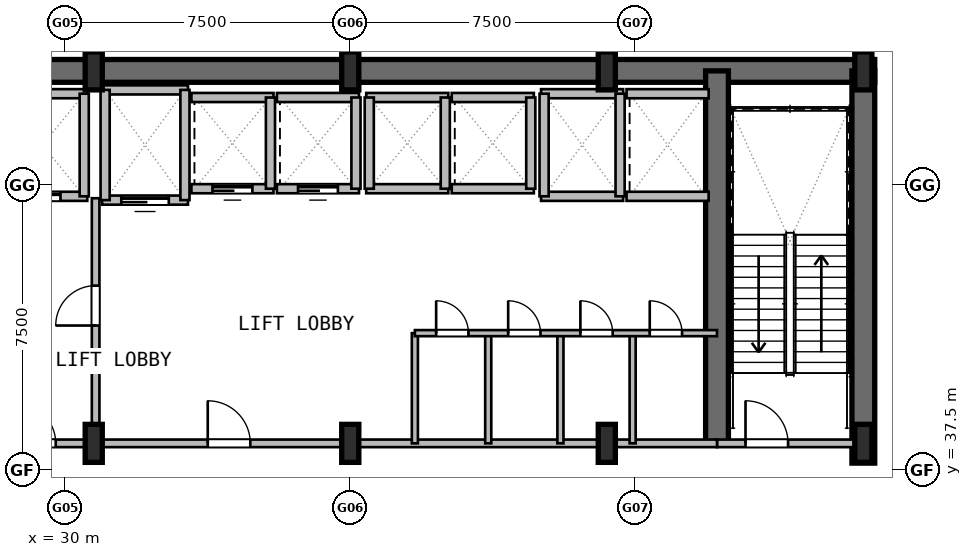
"""IFC4 building model, lengths in metres.
Left out: names, types, materials, properties, quantities, classifications, styles, units other than length and angle.
Written with IfcOpenShell. Run it as: python <this file> out.ifc"""

import sys

from ifc_helpers import new_model, si_unit, direction, frame, frame_2d, origin, origin_2d, place, context, subcontext, project, spatial, rectangle, i_section, extrude, element, fill, save


model = new_model("IFC4")
c1 = context("Model", 3, precision=1e-05, world=origin(), true_north=direction((0.0, 1.0)))
c2 = subcontext(c1, "Body", "Model", "MODEL_VIEW")
j1 = project(units=[si_unit("LENGTHUNIT", "METRE"), si_unit("PLANEANGLEUNIT", "RADIAN")], contexts=[c1])
p1 = place(None, origin())
s1 = spatial("IfcSite", under=j1, at=p1, CompositionType="ELEMENT")
p2 = place(p1, origin())
s2 = spatial("IfcBuilding", under=s1, at=p2, CompositionType="ELEMENT")
p3 = place(p2, frame((0.0, 0.0, 20.4)))
s3 = spatial("IfcBuildingStorey", under=s2, at=p3, CompositionType="ELEMENT", Elevation=20.4)
p4 = place(p3, frame((23.7, 48.0, 0.0), z_axis=(0.0, 0.0, 1.0), x_axis=(1.0, 0.0, 0.0)))
e1 = element("IfcWall", 1, at=p4, inside=s3, PredefinedType="SHEAR", context=c2, shape_type="SweptSolid", body=[
    extrude(rectangle(XDim=27.6, YDim=0.6, at=frame_2d((13.8, 0.0))), origin(), (0.0, 0.0, 1.0), 4.8),
])
p5 = place(p3, frame((51.0, 37.68, 0.0), z_axis=(0.0, 0.0, 1.0), x_axis=(0.0, 1.0, 0.0)))
e2 = element("IfcWall", 2, at=p5, inside=s3, PredefinedType="SHEAR", context=c2, shape_type="SweptSolid", body=[
    extrude(rectangle(XDim=10.32, YDim=0.6, at=frame_2d((5.16, 0.0))), origin(), (0.0, 0.0, 1.0), 4.8),
])
p6 = place(p3, frame((47.15, 38.2, 0.0), z_axis=(0.0, 0.0, 1.0), x_axis=(0.0, 1.0, 0.0)))
e3 = element("IfcWall", 3, at=p6, inside=s3, PredefinedType="SHEAR", context=c2, shape_type="SweptSolid", body=[
    extrude(rectangle(XDim=9.8, YDim=0.6, at=frame_2d((4.9, 0.0))), origin(), (0.0, 0.0, 1.0), 4.8),
])
for number, where, z_axis, x_axis in (
    (4, (30.75, 38.2, 0.0), (0.0, 0.0, 1.0), (1.0, 0.0, 0.0)),
    (5, (30.75, 48.0, 0.0), (0.0, 0.0, 1.0), (1.0, 0.0, 0.0)),
    (6, (37.5, 38.2, 0.0), (0.0, 0.0, 1.0), (1.0, 0.0, 0.0)),
    (7, (37.5, 48.0, 0.0), (0.0, 0.0, 1.0), (1.0, 0.0, 0.0)),
    (8, (44.25, 38.2, 0.0), (0.0, 0.0, 1.0), (1.0, 0.0, 0.0)),
    (9, (44.25, 48.0, 0.0), (0.0, 0.0, 1.0), (1.0, 0.0, 0.0)),
    (10, (51.0, 38.2, 0.0), (0.0, 0.0, 1.0), (1.0, 0.0, 0.0)),
    (11, (51.0, 48.0, 0.0), (0.0, 0.0, 1.0), (1.0, 0.0, 0.0)),
):
    element("IfcColumn", number, at=place(p3, frame(where, z_axis=z_axis, x_axis=x_axis)), inside=s3, PredefinedType="COLUMN", context=c2, shape_type="SweptSolid", body=[
        extrude(i_section(OverallWidth=0.45, OverallDepth=1.0, WebThickness=0.022, FlangeThickness=0.04, at=origin_2d()), origin(), (0.0, 0.0, 1.0), 4.8),
    ])
p7 = place(p3, frame((47.15, 38.2, 0.0), z_axis=(0.0, 0.0, 1.0), x_axis=(1.0, 0.0, 0.0)))
e12 = element("IfcWall", 12, at=p7, inside=s3, PredefinedType="PARTITIONING", context=c2, shape_type="SweptSolid", body=[
    extrude(rectangle(XDim=3.85, YDim=0.2, at=frame_2d((1.925, 0.0))), origin(), (0.0, 0.0, 1.0), 3.63),
])
p8 = place(p7, frame((0.75, 0.0, 0.0)))
e13 = element("IfcOpeningElement", 13, at=p8, cuts=e12, PredefinedType="OPENING", context=c2, shape_type="SweptSolid", body=[
    extrude(rectangle(XDim=1.12, YDim=2.1, at=frame_2d((0.56, 1.05))), frame((0.0, 0.11, 0.0), z_axis=(0.0, -1.0, 0.0), x_axis=(1.0, 0.0, 0.0)), (0.0, 0.0, 1.0), 0.22),
])
p9 = place(p3, frame((30.8, 38.2, 0.0), z_axis=(0.0, 0.0, 1.0), x_axis=(0.0, 1.0, 0.0)))
e14 = element("IfcWall", 14, at=p9, inside=s3, PredefinedType="PARTITIONING", context=c2, shape_type="SweptSolid", body=[
    extrude(rectangle(XDim=6.45, YDim=0.2, at=frame_2d((3.225, 0.0))), origin(), (0.0, 0.0, 1.0), 3.63),
])
p10 = place(p9, frame((3.1, 0.0, 0.0)))
e15 = element("IfcOpeningElement", 15, at=p10, cuts=e14, PredefinedType="OPENING", context=c2, shape_type="SweptSolid", body=[
    extrude(rectangle(XDim=1.05, YDim=2.1, at=frame_2d((0.525, 1.05))), frame((0.0, 0.11, 0.0), z_axis=(0.0, -1.0, 0.0), x_axis=(1.0, 0.0, 0.0)), (0.0, 0.0, 1.0), 0.22),
])
p11 = place(p3, frame((27.95, 38.2, 0.0), z_axis=(0.0, 0.0, 1.0), x_axis=(1.0, 0.0, 0.0)))
e16 = element("IfcWall", 16, at=p11, inside=s3, PredefinedType="PARTITIONING", context=c2, shape_type="SweptSolid", body=[
    extrude(rectangle(XDim=2.85, YDim=0.2, at=frame_2d((1.425, 0.0))), origin(), (0.0, 0.0, 1.0), 3.63),
])
p12 = place(p11, frame((0.75, 0.0, 0.0)))
e17 = element("IfcOpeningElement", 17, at=p12, cuts=e16, PredefinedType="OPENING", context=c2, shape_type="SweptSolid", body=[
    extrude(rectangle(XDim=1.05, YDim=2.1, at=frame_2d((0.525, 1.05))), frame((0.0, 0.11, 0.0), z_axis=(0.0, -1.0, 0.0), x_axis=(1.0, 0.0, 0.0)), (0.0, 0.0, 1.0), 0.22),
])
p13 = place(p3, frame((30.8, 38.2, 0.0), z_axis=(0.0, 0.0, 1.0), x_axis=(1.0, 0.0, 0.0)))
e18 = element("IfcWall", 18, at=p13, inside=s3, PredefinedType="PARTITIONING", context=c2, shape_type="SweptSolid", body=[
    extrude(rectangle(XDim=16.35, YDim=0.2, at=frame_2d((8.175, 0.0))), origin(), (0.0, 0.0, 1.0), 3.63),
])
p14 = place(p13, frame((2.95, 0.0, 0.0)))
e19 = element("IfcOpeningElement", 19, at=p14, cuts=e18, PredefinedType="OPENING", context=c2, shape_type="SweptSolid", body=[
    extrude(rectangle(XDim=1.12, YDim=2.1, at=frame_2d((0.56, 1.05))), frame((0.0, 0.11, 0.0), z_axis=(0.0, -1.0, 0.0), x_axis=(1.0, 0.0, 0.0)), (0.0, 0.0, 1.0), 0.22),
])
p15 = place(p3, frame((28.22, 44.7, 0.0), z_axis=(0.0, 0.0, 1.0), x_axis=(1.0, 0.0, 0.0)))
e20 = element("IfcWall", 20, at=p15, inside=s3, PredefinedType="PARTITIONING", context=c2, shape_type="SweptSolid", body=[
    extrude(rectangle(XDim=2.36, YDim=0.24, at=frame_2d((1.18, 0.0))), origin(), (0.0, 0.0, 1.0), 4.43),
])
p16 = place(p15, frame((0.705, 0.0, 0.0)))
e21 = element("IfcOpeningElement", 21, at=p16, cuts=e20, PredefinedType="OPENING", context=c2, shape_type="SweptSolid", body=[
    extrude(rectangle(XDim=0.95, YDim=2.15, at=frame_2d((0.475, 1.075))), frame((0.0, 0.13, 0.0), z_axis=(0.0, -1.0, 0.0), x_axis=(1.0, 0.0, 0.0)), (0.0, 0.0, 1.0), 0.26),
])
p17 = place(p3, frame((28.22, 47.4, 0.0), z_axis=(0.0, 0.0, 1.0), x_axis=(1.0, 0.0, 0.0)))
e22 = element("IfcWall", 22, at=p17, inside=s3, PredefinedType="PARTITIONING", context=c2, shape_type="SweptSolid", body=[
    extrude(rectangle(XDim=2.36, YDim=0.24, at=frame_2d((1.18, 0.0))), origin(), (0.0, 0.0, 1.0), 4.43),
])
p18 = place(p3, frame((30.5, 44.7, 0.0), z_axis=(0.0, 0.0, 1.0), x_axis=(0.0, 1.0, 0.0)))
e23 = element("IfcWall", 23, at=p18, inside=s3, PredefinedType="PARTITIONING", context=c2, shape_type="SweptSolid", body=[
    extrude(rectangle(XDim=2.7, YDim=0.24, at=frame_2d((1.35, 0.0))), origin(), (0.0, 0.0, 1.0), 3.63),
])
p19 = place(p3, frame((30.97, 44.6, 0.0), z_axis=(0.0, 0.0, 1.0), x_axis=(1.0, 0.0, 0.0)))
e24 = element("IfcWall", 24, at=p19, inside=s3, PredefinedType="PARTITIONING", context=c2, shape_type="SweptSolid", body=[
    extrude(rectangle(XDim=2.26, YDim=0.24, at=frame_2d((1.13, 0.0))), origin(), (0.0, 0.0, 1.0), 4.43),
])
p20 = place(p19, frame((0.505, 0.0, 0.0)))
e25 = element("IfcOpeningElement", 25, at=p20, cuts=e24, PredefinedType="OPENING", context=c2, shape_type="SweptSolid", body=[
    extrude(rectangle(XDim=1.25, YDim=2.2, at=frame_2d((0.625, 1.1))), frame((0.0, 0.13, 0.0), z_axis=(0.0, -1.0, 0.0), x_axis=(1.0, 0.0, 0.0)), (0.0, 0.0, 1.0), 0.26),
])
p21 = place(p3, frame((30.97, 47.5, 0.0), z_axis=(0.0, 0.0, 1.0), x_axis=(1.0, 0.0, 0.0)))
e26 = element("IfcWall", 26, at=p21, inside=s3, PredefinedType="PARTITIONING", context=c2, shape_type="SweptSolid", body=[
    extrude(rectangle(XDim=2.26, YDim=0.24, at=frame_2d((1.13, 0.0))), origin(), (0.0, 0.0, 1.0), 4.43),
])
p22 = place(p3, frame((31.05, 44.6, 0.0), z_axis=(0.0, 0.0, 1.0), x_axis=(0.0, 1.0, 0.0)))
e27 = element("IfcWall", 27, at=p22, inside=s3, PredefinedType="PARTITIONING", context=c2, shape_type="SweptSolid", body=[
    extrude(rectangle(XDim=2.9, YDim=0.24, at=frame_2d((1.45, 0.0))), origin(), (0.0, 0.0, 1.0), 3.63),
])
p23 = place(p3, frame((33.15, 44.6, 0.0), z_axis=(0.0, 0.0, 1.0), x_axis=(0.0, 1.0, 0.0)))
e28 = element("IfcWall", 28, at=p23, inside=s3, PredefinedType="PARTITIONING", context=c2, shape_type="SweptSolid", body=[
    extrude(rectangle(XDim=2.9, YDim=0.24, at=frame_2d((1.45, 0.0))), origin(), (0.0, 0.0, 1.0), 4.43),
])
p24 = place(p3, frame((33.32, 44.9, 0.0), z_axis=(0.0, 0.0, 1.0), x_axis=(1.0, 0.0, 0.0)))
e29 = element("IfcWall", 29, at=p24, inside=s3, PredefinedType="PARTITIONING", context=c2, shape_type="SweptSolid", body=[
    extrude(rectangle(XDim=2.16, YDim=0.24, at=frame_2d((1.08, 0.0))), origin(), (0.0, 0.0, 1.0), 4.43),
])
p25 = place(p24, frame((0.555, 0.0, 0.0)))
e30 = element("IfcOpeningElement", 30, at=p25, cuts=e29, PredefinedType="OPENING", context=c2, shape_type="SweptSolid", body=[
    extrude(rectangle(XDim=1.05, YDim=2.15, at=frame_2d((0.525, 1.075))), frame((0.0, 0.13, 0.0), z_axis=(0.0, -1.0, 0.0), x_axis=(1.0, 0.0, 0.0)), (0.0, 0.0, 1.0), 0.26),
])
p26 = place(p3, frame((33.32, 47.3, 0.0), z_axis=(0.0, 0.0, 1.0), x_axis=(1.0, 0.0, 0.0)))
e31 = element("IfcWall", 31, at=p26, inside=s3, PredefinedType="PARTITIONING", context=c2, shape_type="SweptSolid", body=[
    extrude(rectangle(XDim=2.16, YDim=0.24, at=frame_2d((1.08, 0.0))), origin(), (0.0, 0.0, 1.0), 4.43),
])
p27 = place(p3, frame((35.4, 44.9, 0.0), z_axis=(0.0, 0.0, 1.0), x_axis=(0.0, 1.0, 0.0)))
e32 = element("IfcWall", 32, at=p27, inside=s3, PredefinedType="PARTITIONING", context=c2, shape_type="SweptSolid", body=[
    extrude(rectangle(XDim=2.4, YDim=0.24, at=frame_2d((1.2, 0.0))), origin(), (0.0, 0.0, 1.0), 4.43),
])
p28 = place(p3, frame((35.57, 44.9, 0.0), z_axis=(0.0, 0.0, 1.0), x_axis=(1.0, 0.0, 0.0)))
e33 = element("IfcWall", 33, at=p28, inside=s3, PredefinedType="PARTITIONING", context=c2, shape_type="SweptSolid", body=[
    extrude(rectangle(XDim=2.16, YDim=0.24, at=frame_2d((1.08, 0.0))), origin(), (0.0, 0.0, 1.0), 4.43),
])
p29 = place(p28, frame((0.555, 0.0, 0.0)))
e34 = element("IfcOpeningElement", 34, at=p29, cuts=e33, PredefinedType="OPENING", context=c2, shape_type="SweptSolid", body=[
    extrude(rectangle(XDim=1.05, YDim=2.15, at=frame_2d((0.525, 1.075))), frame((0.0, 0.13, 0.0), z_axis=(0.0, -1.0, 0.0), x_axis=(1.0, 0.0, 0.0)), (0.0, 0.0, 1.0), 0.26),
])
p30 = place(p3, frame((35.57, 47.3, 0.0), z_axis=(0.0, 0.0, 1.0), x_axis=(1.0, 0.0, 0.0)))
e35 = element("IfcWall", 35, at=p30, inside=s3, PredefinedType="PARTITIONING", context=c2, shape_type="SweptSolid", body=[
    extrude(rectangle(XDim=2.16, YDim=0.24, at=frame_2d((1.08, 0.0))), origin(), (0.0, 0.0, 1.0), 4.43),
])
p31 = place(p3, frame((37.65, 44.9, 0.0), z_axis=(0.0, 0.0, 1.0), x_axis=(0.0, 1.0, 0.0)))
e36 = element("IfcWall", 36, at=p31, inside=s3, PredefinedType="PARTITIONING", context=c2, shape_type="SweptSolid", body=[
    extrude(rectangle(XDim=2.4, YDim=0.24, at=frame_2d((1.2, 0.0))), origin(), (0.0, 0.0, 1.0), 4.43),
])
for number, where, z_axis, x_axis in (
    (37, (37.92, 44.9, 0.0), (0.0, 0.0, 1.0), (1.0, 0.0, 0.0)),
    (38, (37.92, 47.3, 0.0), (0.0, 0.0, 1.0), (1.0, 0.0, 0.0)),
):
    element("IfcWall", number, at=place(p3, frame(where, z_axis=z_axis, x_axis=x_axis)), inside=s3, PredefinedType="PARTITIONING", context=c2, shape_type="SweptSolid", body=[
        extrude(rectangle(XDim=2.16, YDim=0.24, at=frame_2d((1.08, 0.0))), origin(), (0.0, 0.0, 1.0), 4.43),
    ])
for number, where, z_axis, x_axis in (
    (39, (38.0, 44.9, 0.0), (0.0, 0.0, 1.0), (0.0, 1.0, 0.0)),
    (40, (40.0, 44.9, 0.0), (0.0, 0.0, 1.0), (0.0, 1.0, 0.0)),
):
    element("IfcWall", number, at=place(p3, frame(where, z_axis=z_axis, x_axis=x_axis)), inside=s3, PredefinedType="PARTITIONING", context=c2, shape_type="SweptSolid", body=[
        extrude(rectangle(XDim=2.4, YDim=0.24, at=frame_2d((1.2, 0.0))), origin(), (0.0, 0.0, 1.0), 4.43),
    ])
for number, where, z_axis, x_axis in (
    (41, (40.17, 44.9, 0.0), (0.0, 0.0, 1.0), (1.0, 0.0, 0.0)),
    (42, (40.17, 47.3, 0.0), (0.0, 0.0, 1.0), (1.0, 0.0, 0.0)),
):
    element("IfcWall", number, at=place(p3, frame(where, z_axis=z_axis, x_axis=x_axis)), inside=s3, PredefinedType="PARTITIONING", context=c2, shape_type="SweptSolid", body=[
        extrude(rectangle(XDim=2.16, YDim=0.24, at=frame_2d((1.08, 0.0))), origin(), (0.0, 0.0, 1.0), 4.43),
    ])
p32 = place(p3, frame((42.25, 44.9, 0.0), z_axis=(0.0, 0.0, 1.0), x_axis=(0.0, 1.0, 0.0)))
e43 = element("IfcWall", 43, at=p32, inside=s3, PredefinedType="PARTITIONING", context=c2, shape_type="SweptSolid", body=[
    extrude(rectangle(XDim=2.4, YDim=0.24, at=frame_2d((1.2, 0.0))), origin(), (0.0, 0.0, 1.0), 4.43),
])
for number, where, z_axis, x_axis in (
    (44, (42.52, 44.7, 0.0), (0.0, 0.0, 1.0), (1.0, 0.0, 0.0)),
    (45, (42.52, 47.4, 0.0), (0.0, 0.0, 1.0), (1.0, 0.0, 0.0)),
):
    element("IfcWall", number, at=place(p3, frame(where, z_axis=z_axis, x_axis=x_axis)), inside=s3, PredefinedType="PARTITIONING", context=c2, shape_type="SweptSolid", body=[
        extrude(rectangle(XDim=2.16, YDim=0.24, at=frame_2d((1.08, 0.0))), origin(), (0.0, 0.0, 1.0), 4.43),
    ])
for number, where, z_axis, x_axis in (
    (46, (42.6, 44.7, 0.0), (0.0, 0.0, 1.0), (0.0, 1.0, 0.0)),
    (47, (44.6, 44.7, 0.0), (0.0, 0.0, 1.0), (0.0, 1.0, 0.0)),
):
    element("IfcWall", number, at=place(p3, frame(where, z_axis=z_axis, x_axis=x_axis)), inside=s3, PredefinedType="PARTITIONING", context=c2, shape_type="SweptSolid", body=[
        extrude(rectangle(XDim=2.7, YDim=0.24, at=frame_2d((1.35, 0.0))), origin(), (0.0, 0.0, 1.0), 4.43),
    ])
for number, where, z_axis, x_axis in (
    (48, (44.77, 44.7, 0.0), (0.0, 0.0, 1.0), (1.0, 0.0, 0.0)),
    (49, (44.77, 47.4, 0.0), (0.0, 0.0, 1.0), (1.0, 0.0, 0.0)),
):
    element("IfcWall", number, at=place(p3, frame(where, z_axis=z_axis, x_axis=x_axis)), inside=s3, PredefinedType="PARTITIONING", context=c2, shape_type="SweptSolid", body=[
        extrude(rectangle(XDim=2.16, YDim=0.24, at=frame_2d((1.08, 0.0))), origin(), (0.0, 0.0, 1.0), 4.43),
    ])
for number, where, z_axis, x_axis in (
    (50, (39.2, 38.2, 0.0), (0.0, 0.0, 1.0), (0.0, 1.0, 0.0)),
    (51, (41.13, 38.2, 0.0), (0.0, 0.0, 1.0), (0.0, 1.0, 0.0)),
    (52, (43.03, 38.2, 0.0), (0.0, 0.0, 1.0), (0.0, 1.0, 0.0)),
    (53, (44.93, 38.2, 0.0), (0.0, 0.0, 1.0), (0.0, 1.0, 0.0)),
):
    element("IfcWall", number, at=place(p3, frame(where, z_axis=z_axis, x_axis=x_axis)), inside=s3, PredefinedType="PARTITIONING", context=c2, shape_type="SweptSolid", body=[
        extrude(rectangle(XDim=2.9, YDim=0.16, at=frame_2d((1.45, 0.0))), origin(), (0.0, 0.0, 1.0), 4.43),
    ])
p33 = place(p3, frame((39.2, 41.1, 0.0), z_axis=(0.0, 0.0, 1.0), x_axis=(1.0, 0.0, 0.0)))
e54 = element("IfcWall", 54, at=p33, inside=s3, PredefinedType="PARTITIONING", context=c2, shape_type="SweptSolid", body=[
    extrude(rectangle(XDim=7.95, YDim=0.16, at=frame_2d((3.975, 0.0))), origin(), (0.0, 0.0, 1.0), 4.43),
])
p34 = place(p33, frame((0.56, 0.0, 0.0)))
e55 = element("IfcOpeningElement", 55, at=p34, cuts=e54, PredefinedType="OPENING", context=c2, shape_type="SweptSolid", body=[
    extrude(rectangle(XDim=0.85, YDim=2.05, at=frame_2d((0.425, 1.025))), frame((0.0, 0.09, 0.0), z_axis=(0.0, -1.0, 0.0), x_axis=(1.0, 0.0, 0.0)), (0.0, 0.0, 1.0), 0.18),
])
p35 = place(p33, frame((2.455, 0.0, 0.0)))
e56 = element("IfcOpeningElement", 56, at=p35, cuts=e54, PredefinedType="OPENING", context=c2, shape_type="SweptSolid", body=[
    extrude(rectangle(XDim=0.85, YDim=2.05, at=frame_2d((0.425, 1.025))), frame((0.0, 0.09, 0.0), z_axis=(0.0, -1.0, 0.0), x_axis=(1.0, 0.0, 0.0)), (0.0, 0.0, 1.0), 0.18),
])
p36 = place(p33, frame((4.355, 0.0, 0.0)))
e57 = element("IfcOpeningElement", 57, at=p36, cuts=e54, PredefinedType="OPENING", context=c2, shape_type="SweptSolid", body=[
    extrude(rectangle(XDim=0.85, YDim=2.05, at=frame_2d((0.425, 1.025))), frame((0.0, 0.09, 0.0), z_axis=(0.0, -1.0, 0.0), x_axis=(1.0, 0.0, 0.0)), (0.0, 0.0, 1.0), 0.18),
])
p37 = place(p33, frame((6.18, 0.0, 0.0)))
e58 = element("IfcOpeningElement", 58, at=p37, cuts=e54, PredefinedType="OPENING", context=c2, shape_type="SweptSolid", body=[
    extrude(rectangle(XDim=0.85, YDim=2.05, at=frame_2d((0.425, 1.025))), frame((0.0, 0.09, 0.0), z_axis=(0.0, -1.0, 0.0), x_axis=(1.0, 0.0, 0.0)), (0.0, 0.0, 1.0), 0.18),
])
p38 = place(p8, origin())
e59 = element("IfcDoor", 59, at=p38, inside=s3, OperationType="SINGLE_SWING_LEFT", PredefinedType="DOOR", context=c2, shape_type="SweptSolid", body=[
    extrude(rectangle(XDim=1.12, YDim=2.1, at=frame_2d((0.56, 1.05))), frame((0.0, 0.025, 0.0), z_axis=(0.0, -1.0, 0.0), x_axis=(1.0, 0.0, 0.0)), (0.0, 0.0, 1.0), 0.05),
])
fill(e13, e59)
p39 = place(p10, origin())
e60 = element("IfcDoor", 60, at=p39, inside=s3, OperationType="SINGLE_SWING_RIGHT", PredefinedType="DOOR", context=c2, shape_type="SweptSolid", body=[
    extrude(rectangle(XDim=1.05, YDim=2.1, at=frame_2d((0.525, 1.05))), frame((0.0, 0.025, 0.0), z_axis=(0.0, -1.0, 0.0), x_axis=(1.0, 0.0, 0.0)), (0.0, 0.0, 1.0), 0.05),
])
fill(e15, e60)
p40 = place(p12, origin())
e61 = element("IfcDoor", 61, at=p40, inside=s3, OperationType="SINGLE_SWING_LEFT", PredefinedType="DOOR", context=c2, shape_type="SweptSolid", body=[
    extrude(rectangle(XDim=1.05, YDim=2.1, at=frame_2d((0.525, 1.05))), frame((0.0, 0.025, 0.0), z_axis=(0.0, -1.0, 0.0), x_axis=(1.0, 0.0, 0.0)), (0.0, 0.0, 1.0), 0.05),
])
fill(e17, e61)
p41 = place(p14, origin())
e62 = element("IfcDoor", 62, at=p41, inside=s3, OperationType="SINGLE_SWING_RIGHT", PredefinedType="DOOR", context=c2, shape_type="SweptSolid", body=[
    extrude(rectangle(XDim=1.12, YDim=2.1, at=frame_2d((0.56, 1.05))), frame((0.0, 0.025, 0.0), z_axis=(0.0, -1.0, 0.0), x_axis=(1.0, 0.0, 0.0)), (0.0, 0.0, 1.0), 0.05),
])
fill(e19, e62)
p42 = place(p16, origin())
e63 = element("IfcDoor", 63, at=p42, inside=s3, OperationType="SLIDING_TO_LEFT", PredefinedType="DOOR", context=c2, shape_type="SweptSolid", body=[
    extrude(rectangle(XDim=0.95, YDim=2.15, at=frame_2d((0.475, 1.075))), frame((0.0, 0.025, 0.0), z_axis=(0.0, -1.0, 0.0), x_axis=(1.0, 0.0, 0.0)), (0.0, 0.0, 1.0), 0.05),
])
fill(e21, e63)
p43 = place(p20, origin())
e64 = element("IfcDoor", 64, at=p43, inside=s3, OperationType="SLIDING_TO_LEFT", PredefinedType="DOOR", context=c2, shape_type="SweptSolid", body=[
    extrude(rectangle(XDim=1.25, YDim=2.2, at=frame_2d((0.625, 1.1))), frame((0.0, 0.025, 0.0), z_axis=(0.0, -1.0, 0.0), x_axis=(1.0, 0.0, 0.0)), (0.0, 0.0, 1.0), 0.05),
])
fill(e25, e64)
p44 = place(p25, origin())
e65 = element("IfcDoor", 65, at=p44, inside=s3, OperationType="SLIDING_TO_LEFT", PredefinedType="DOOR", context=c2, shape_type="SweptSolid", body=[
    extrude(rectangle(XDim=1.05, YDim=2.15, at=frame_2d((0.525, 1.075))), frame((0.0, 0.025, 0.0), z_axis=(0.0, -1.0, 0.0), x_axis=(1.0, 0.0, 0.0)), (0.0, 0.0, 1.0), 0.05),
])
fill(e30, e65)
p45 = place(p29, origin())
e66 = element("IfcDoor", 66, at=p45, inside=s3, OperationType="SLIDING_TO_LEFT", PredefinedType="DOOR", context=c2, shape_type="SweptSolid", body=[
    extrude(rectangle(XDim=1.05, YDim=2.15, at=frame_2d((0.525, 1.075))), frame((0.0, 0.025, 0.0), z_axis=(0.0, -1.0, 0.0), x_axis=(1.0, 0.0, 0.0)), (0.0, 0.0, 1.0), 0.05),
])
fill(e34, e66)
p46 = place(p34, origin())
e67 = element("IfcDoor", 67, at=p46, inside=s3, OperationType="SINGLE_SWING_RIGHT", PredefinedType="DOOR", context=c2, shape_type="SweptSolid", body=[
    extrude(rectangle(XDim=0.85, YDim=2.05, at=frame_2d((0.425, 1.025))), frame((0.0, 0.025, 0.0), z_axis=(0.0, -1.0, 0.0), x_axis=(1.0, 0.0, 0.0)), (0.0, 0.0, 1.0), 0.05),
])
fill(e55, e67)
p47 = place(p35, origin())
e68 = element("IfcDoor", 68, at=p47, inside=s3, OperationType="SINGLE_SWING_LEFT", PredefinedType="DOOR", context=c2, shape_type="SweptSolid", body=[
    extrude(rectangle(XDim=0.85, YDim=2.05, at=frame_2d((0.425, 1.025))), frame((0.0, 0.025, 0.0), z_axis=(0.0, -1.0, 0.0), x_axis=(1.0, 0.0, 0.0)), (0.0, 0.0, 1.0), 0.05),
])
fill(e56, e68)
p48 = place(p36, origin())
e69 = element("IfcDoor", 69, at=p48, inside=s3, OperationType="SINGLE_SWING_RIGHT", PredefinedType="DOOR", context=c2, shape_type="SweptSolid", body=[
    extrude(rectangle(XDim=0.85, YDim=2.05, at=frame_2d((0.425, 1.025))), frame((0.0, 0.025, 0.0), z_axis=(0.0, -1.0, 0.0), x_axis=(1.0, 0.0, 0.0)), (0.0, 0.0, 1.0), 0.05),
])
fill(e57, e69)
p49 = place(p37, origin())
e70 = element("IfcDoor", 70, at=p49, inside=s3, OperationType="SINGLE_SWING_LEFT", PredefinedType="DOOR", context=c2, shape_type="SweptSolid", body=[
    extrude(rectangle(XDim=0.85, YDim=2.05, at=frame_2d((0.425, 1.025))), frame((0.0, 0.025, 0.0), z_axis=(0.0, -1.0, 0.0), x_axis=(1.0, 0.0, 0.0)), (0.0, 0.0, 1.0), 0.05),
])
fill(e58, e70)
save(model, sys.argv[1])
